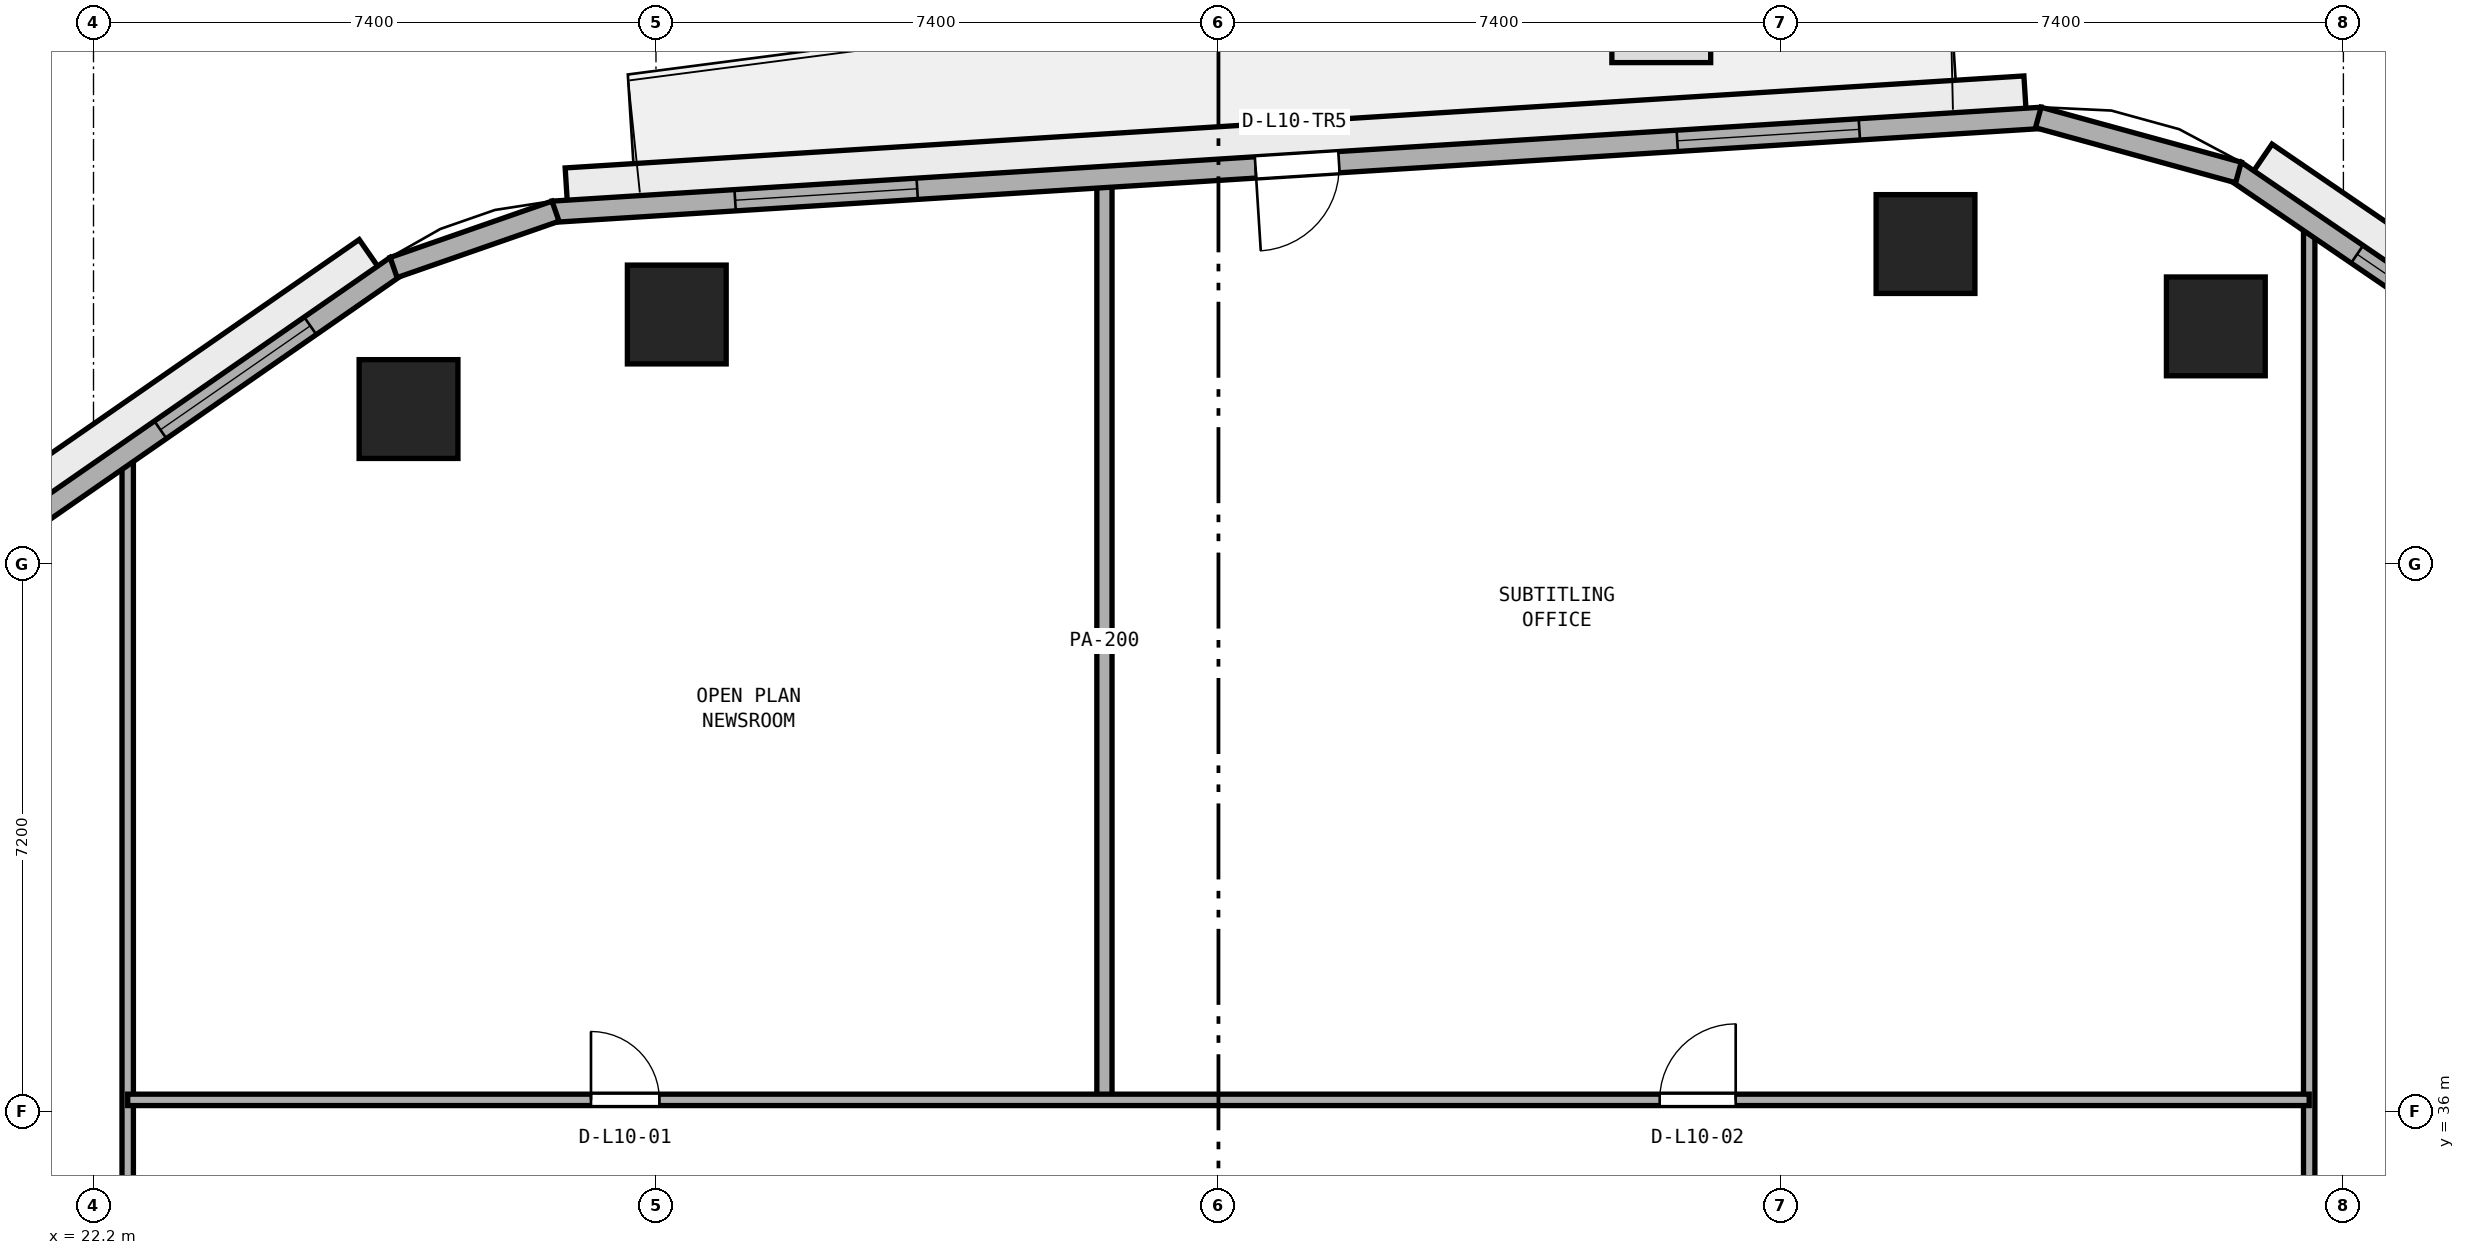
"""IFC4 building model, lengths in metres.
Left out: names, types, materials, properties, quantities, classifications, styles, units other than length and angle.
Written with IfcOpenShell. Run it as: python <this file> out.ifc"""

import sys

from ifc_helpers import new_model, si_unit, direction, frame, frame_2d, origin, origin_2d, place, context, subcontext, project, spatial, rectangle, extrude, element, fill, save


model = new_model("IFC4")
c1 = context("Model", 3, precision=1e-05, world=origin(), true_north=direction((0.0, 1.0)))
c2 = subcontext(c1, "Body", "Model", "MODEL_VIEW")
j1 = project(units=[si_unit("LENGTHUNIT", "METRE"), si_unit("PLANEANGLEUNIT", "RADIAN")], contexts=[c1])
p1 = place(None, origin())
s1 = spatial("IfcSite", under=j1, at=p1, CompositionType="ELEMENT")
p2 = place(p1, origin())
s2 = spatial("IfcBuilding", under=s1, at=p2, CompositionType="ELEMENT")
p3 = place(p2, frame((0.0, 0.0, 44.0)))
s3 = spatial("IfcBuildingStorey", under=s2, at=p3, CompositionType="ELEMENT", Elevation=44.0)
for number, where, z_axis, x_axis in (
    (1, (50.122, 46.326, 0.0), (0.0, 0.0, 1.0), (1.0, 0.0, 0.0)),
    (2, (46.302, 47.409, 0.0), (0.0, 0.0, 1.0), (1.0, 0.0, 0.0)),
    (3, (29.874, 46.482, 0.0), (0.0, 0.0, 1.0), (1.0, 0.0, 0.0)),
    (4, (26.344, 45.238, 0.0), (0.0, 0.0, 1.0), (1.0, 0.0, 0.0)),
):
    element("IfcColumn", number, at=place(p3, frame(where, z_axis=z_axis, x_axis=x_axis)), inside=s3, PredefinedType="COLUMN", context=c2, shape_type="SweptSolid", body=[
        extrude(rectangle(XDim=1.3, YDim=1.3, at=origin_2d()), origin(), (0.0, 0.0, 1.0), 3.8),
    ])
p4 = place(p3, frame((51.35, 2.843, 0.0), z_axis=(0.0, 0.0, 1.0), x_axis=(0.0, 1.0, 0.0)))
e5 = element("IfcWall", 5, at=p4, inside=s3, PredefinedType="PARTITIONING", context=c2, shape_type="SweptSolid", body=[
    extrude(rectangle(XDim=44.892, YDim=0.15, at=frame_2d((22.446, 0.0))), origin(), (0.0, 0.0, 1.0), 3.525),
])
p5 = place(p4, frame((21.907, 0.0, 0.0)))
e6 = element("IfcOpeningElement", 6, at=p5, cuts=e5, PredefinedType="OPENING", context=c2, shape_type="SweptSolid", body=[
    extrude(rectangle(XDim=0.9, YDim=2.1, at=frame_2d((0.45, 1.05))), frame((0.0, 0.085, 0.0), z_axis=(0.0, -1.0, 0.0), x_axis=(1.0, 0.0, 0.0)), (0.0, 0.0, 1.0), 0.17),
])
p6 = place(p3, frame((35.5, 36.15, 0.0), z_axis=(0.0, 0.0, 1.0), x_axis=(0.0, 1.0, 0.0)))
e7 = element("IfcWall", 7, at=p6, inside=s3, PredefinedType="PARTITIONING", context=c2, shape_type="SweptSolid", body=[
    extrude(rectangle(XDim=12.077, YDim=0.2, at=frame_2d((6.039, 0.0))), origin(), (0.0, 0.0, 1.0), 3.525),
])
p7 = place(p3, frame((22.65, 5.476, 0.0), z_axis=(0.0, 0.0, 1.0), x_axis=(0.0, 1.0, 0.0)))
e8 = element("IfcWall", 8, at=p7, inside=s3, PredefinedType="PARTITIONING", context=c2, shape_type="SweptSolid", body=[
    extrude(rectangle(XDim=39.221, YDim=0.15, at=frame_2d((19.61, 0.0))), origin(), (0.0, 0.0, 1.0), 3.525),
])
p8 = place(p7, frame((11.199, 0.0, 0.0)))
e9 = element("IfcOpeningElement", 9, at=p8, cuts=e8, PredefinedType="OPENING", context=c2, shape_type="SweptSolid", body=[
    extrude(rectangle(XDim=0.9, YDim=2.1, at=frame_2d((0.45, 1.05))), frame((0.0, 0.085, 0.0), z_axis=(0.0, -1.0, 0.0), x_axis=(1.0, 0.0, 0.0)), (0.0, 0.0, 1.0), 0.17),
])
p9 = place(p7, frame((17.824, 0.0, 0.0)))
e10 = element("IfcOpeningElement", 10, at=p9, cuts=e8, PredefinedType="OPENING", context=c2, shape_type="SweptSolid", body=[
    extrude(rectangle(XDim=0.9, YDim=2.1, at=frame_2d((0.45, 1.05))), frame((0.0, 0.085, 0.0), z_axis=(0.0, -1.0, 0.0), x_axis=(1.0, 0.0, 0.0)), (0.0, 0.0, 1.0), 0.17),
])
p10 = place(p7, frame((25.899, 0.0, 0.0)))
e11 = element("IfcOpeningElement", 11, at=p10, cuts=e8, PredefinedType="OPENING", context=c2, shape_type="SweptSolid", body=[
    extrude(rectangle(XDim=0.9, YDim=2.1, at=frame_2d((0.45, 1.05))), frame((0.0, 0.085, 0.0), z_axis=(0.0, -1.0, 0.0), x_axis=(1.0, 0.0, 0.0)), (0.0, 0.0, 1.0), 0.17),
])
p11 = place(p3, frame((22.65, 36.15, 0.0), z_axis=(0.0, 0.0, 1.0), x_axis=(1.0, 0.0, 0.0)))
e12 = element("IfcWall", 12, at=p11, inside=s3, PredefinedType="PARTITIONING", context=c2, shape_type="SweptSolid", body=[
    extrude(rectangle(XDim=28.7, YDim=0.15, at=frame_2d((14.35, 0.0))), origin(), (0.0, 0.0, 1.0), 3.525),
])
p12 = place(p11, frame((6.095, 0.0, 0.0)))
e13 = element("IfcOpeningElement", 13, at=p12, cuts=e12, PredefinedType="OPENING", context=c2, shape_type="SweptSolid", body=[
    extrude(rectangle(XDim=0.9, YDim=2.1, at=frame_2d((0.45, 1.05))), frame((0.0, 0.085, 0.0), z_axis=(0.0, -1.0, 0.0), x_axis=(1.0, 0.0, 0.0)), (0.0, 0.0, 1.0), 0.17),
])
p13 = place(p11, frame((20.155, 0.0, 0.0)))
e14 = element("IfcOpeningElement", 14, at=p13, cuts=e12, PredefinedType="OPENING", context=c2, shape_type="SweptSolid", body=[
    extrude(rectangle(XDim=1.0, YDim=2.12, at=frame_2d((0.5, 1.06))), frame((0.0, 0.085, 0.0), z_axis=(0.0, -1.0, 0.0), x_axis=(1.0, 0.0, 0.0)), (0.0, 0.0, 1.0), 0.17),
])
p14 = place(p3, frame((64.29, 38.867, 0.0), z_axis=(0.0, 0.0, 1.0), x_axis=(-0.825755550159, 0.564028165416, 0.0)))
e15 = element("IfcWall", 15, at=p14, inside=s3, PredefinedType="STANDARD", context=c2, shape_type="SweptSolid", body=[
    extrude(rectangle(XDim=16.848, YDim=0.28, at=frame_2d((8.424, 0.0))), origin(), (0.0, 0.0, 1.0), 3.525),
])
p15 = place(p14, frame((1.941, 0.0, 0.9)))
e16 = element("IfcOpeningElement", 16, at=p15, cuts=e15, PredefinedType="OPENING", context=c2, shape_type="SweptSolid", body=[
    extrude(rectangle(XDim=2.4, YDim=1.75, at=frame_2d((1.2, 0.875))), frame((0.0, 0.15, 0.0), z_axis=(0.0, -1.0, 0.0), x_axis=(1.0, 0.0, 0.0)), (0.0, 0.0, 1.0), 0.3),
])
p16 = place(p14, frame((7.224, 0.0, 0.9)))
e17 = element("IfcOpeningElement", 17, at=p16, cuts=e15, PredefinedType="OPENING", context=c2, shape_type="SweptSolid", body=[
    extrude(rectangle(XDim=2.4, YDim=1.75, at=frame_2d((1.2, 0.875))), frame((0.0, 0.15, 0.0), z_axis=(0.0, -1.0, 0.0), x_axis=(1.0, 0.0, 0.0)), (0.0, 0.0, 1.0), 0.3),
])
p17 = place(p14, frame((12.507, 0.0, 0.9)))
e18 = element("IfcOpeningElement", 18, at=p17, cuts=e15, PredefinedType="OPENING", context=c2, shape_type="SweptSolid", body=[
    extrude(rectangle(XDim=2.4, YDim=1.75, at=frame_2d((1.2, 0.875))), frame((0.0, 0.15, 0.0), z_axis=(0.0, -1.0, 0.0), x_axis=(1.0, 0.0, 0.0)), (0.0, 0.0, 1.0), 0.3),
])
p18 = place(p3, frame((47.832, 49.069, 0.0), z_axis=(0.0, 0.0, 1.0), x_axis=(-0.998017725054, -0.062933460723, 0.0)))
e19 = element("IfcWall", 19, at=p18, inside=s3, PredefinedType="STANDARD", context=c2, shape_type="SweptSolid", body=[
    extrude(rectangle(XDim=19.629, YDim=0.28, at=frame_2d((9.815, 0.0))), origin(), (0.0, 0.0, 1.0), 3.525),
])
p19 = place(p18, frame((9.265, 0.0, 0.0)))
e20 = element("IfcOpeningElement", 20, at=p19, cuts=e19, PredefinedType="OPENING", context=c2, shape_type="SweptSolid", body=[
    extrude(rectangle(XDim=1.1, YDim=2.2, at=frame_2d((0.55, 1.1))), frame((0.0, 0.15, 0.0), z_axis=(0.0, -1.0, 0.0), x_axis=(1.0, 0.0, 0.0)), (0.0, 0.0, 1.0), 0.3),
])
p20 = place(p18, frame((2.405, 0.0, 0.9)))
e21 = element("IfcOpeningElement", 21, at=p20, cuts=e19, PredefinedType="OPENING", context=c2, shape_type="SweptSolid", body=[
    extrude(rectangle(XDim=2.4, YDim=1.75, at=frame_2d((1.2, 0.875))), frame((0.0, 0.15, 0.0), z_axis=(0.0, -1.0, 0.0), x_axis=(1.0, 0.0, 0.0)), (0.0, 0.0, 1.0), 0.3),
])
p21 = place(p18, frame((14.825, 0.0, 0.9)))
e22 = element("IfcOpeningElement", 22, at=p21, cuts=e19, PredefinedType="OPENING", context=c2, shape_type="SweptSolid", body=[
    extrude(rectangle(XDim=2.4, YDim=1.75, at=frame_2d((1.2, 0.875))), frame((0.0, 0.15, 0.0), z_axis=(0.0, -1.0, 0.0), x_axis=(1.0, 0.0, 0.0)), (0.0, 0.0, 1.0), 0.3),
])
p22 = place(p3, frame((26.182, 47.118, 0.0), z_axis=(0.0, 0.0, 1.0), x_axis=(-0.821547956627, -0.570139417127, 0.0)))
e23 = element("IfcWall", 23, at=p22, inside=s3, PredefinedType="STANDARD", context=c2, shape_type="SweptSolid", body=[
    extrude(rectangle(XDim=18.132, YDim=0.28, at=frame_2d((9.066, 0.0))), origin(), (0.0, 0.0, 1.0), 3.525),
])
p23 = place(p22, frame((1.375, 0.0, 0.9)))
e24 = element("IfcOpeningElement", 24, at=p23, cuts=e23, PredefinedType="OPENING", context=c2, shape_type="SweptSolid", body=[
    extrude(rectangle(XDim=2.4, YDim=1.75, at=frame_2d((1.2, 0.875))), frame((0.0, 0.15, 0.0), z_axis=(0.0, -1.0, 0.0), x_axis=(1.0, 0.0, 0.0)), (0.0, 0.0, 1.0), 0.3),
])
p24 = place(p22, frame((7.866, 0.0, 0.9)))
e25 = element("IfcOpeningElement", 25, at=p24, cuts=e23, PredefinedType="OPENING", context=c2, shape_type="SweptSolid", body=[
    extrude(rectangle(XDim=2.4, YDim=1.75, at=frame_2d((1.2, 0.875))), frame((0.0, 0.15, 0.0), z_axis=(0.0, -1.0, 0.0), x_axis=(1.0, 0.0, 0.0)), (0.0, 0.0, 1.0), 0.3),
])
p25 = place(p22, frame((13.577, 0.0, 0.9)))
e26 = element("IfcOpeningElement", 26, at=p25, cuts=e23, PredefinedType="OPENING", context=c2, shape_type="SweptSolid", body=[
    extrude(rectangle(XDim=2.4, YDim=1.75, at=frame_2d((1.2, 0.875))), frame((0.0, 0.15, 0.0), z_axis=(0.0, -1.0, 0.0), x_axis=(1.0, 0.0, 0.0)), (0.0, 0.0, 1.0), 0.3),
])
p26 = place(p3, frame((50.419, 48.351, 0.0), z_axis=(0.0, 0.0, 1.0), x_axis=(-0.964254516967, 0.264977784933, 0.0)))
e27 = element("IfcWall", 27, at=p26, inside=s3, PredefinedType="STANDARD", context=c2, shape_type="SweptSolid", body=[
    extrude(rectangle(XDim=2.731, YDim=0.28, at=frame_2d((1.365, 0.0))), origin(), (0.0, 0.0, 1.0), 3.525),
])
p27 = place(p3, frame((28.278, 47.842, 0.0), z_axis=(0.0, 0.0, 1.0), x_axis=(-0.9444559001, -0.328638179106, 0.0)))
e28 = element("IfcWall", 28, at=p27, inside=s3, PredefinedType="STANDARD", context=c2, shape_type="SweptSolid", body=[
    extrude(rectangle(XDim=2.255, YDim=0.28, at=frame_2d((1.128, 0.0))), origin(), (0.0, 0.0, 1.0), 3.525),
])
p28 = place(p12, origin())
e29 = element("IfcDoor", 29, at=p28, inside=s3, OperationType="SINGLE_SWING_LEFT", PredefinedType="DOOR", context=c2, shape_type="SweptSolid", body=[
    extrude(rectangle(XDim=0.9, YDim=2.1, at=frame_2d((0.45, 1.05))), frame((0.0, 0.025, 0.0), z_axis=(0.0, -1.0, 0.0), x_axis=(1.0, 0.0, 0.0)), (0.0, 0.0, 1.0), 0.05),
])
fill(e13, e29)
p29 = place(p13, origin())
e30 = element("IfcDoor", 30, at=p29, inside=s3, OperationType="SINGLE_SWING_RIGHT", PredefinedType="DOOR", context=c2, shape_type="SweptSolid", body=[
    extrude(rectangle(XDim=1.0, YDim=2.12, at=frame_2d((0.5, 1.06))), frame((0.0, 0.025, 0.0), z_axis=(0.0, -1.0, 0.0), x_axis=(1.0, 0.0, 0.0)), (0.0, 0.0, 1.0), 0.05),
])
fill(e14, e30)
p30 = place(p17, origin())
e31 = element("IfcWindow", 31, at=p30, inside=s3, PartitioningType="SINGLE_PANEL", PredefinedType="WINDOW", context=c2, shape_type="SweptSolid", body=[
    extrude(rectangle(XDim=2.4, YDim=1.75, at=frame_2d((1.2, 0.875))), frame((0.0, 0.03, 0.0), z_axis=(0.0, -1.0, 0.0), x_axis=(1.0, 0.0, 0.0)), (0.0, 0.0, 1.0), 0.06),
])
fill(e18, e31)
p31 = place(p19, origin())
e32 = element("IfcDoor", 32, at=p31, inside=s3, OperationType="SINGLE_SWING_RIGHT", PredefinedType="DOOR", context=c2, shape_type="SweptSolid", body=[
    extrude(rectangle(XDim=1.1, YDim=2.2, at=frame_2d((0.55, 1.1))), frame((0.0, 0.025, 0.0), z_axis=(0.0, -1.0, 0.0), x_axis=(1.0, 0.0, 0.0)), (0.0, 0.0, 1.0), 0.05),
])
fill(e20, e32)
p32 = place(p20, origin())
e33 = element("IfcWindow", 33, at=p32, inside=s3, PartitioningType="SINGLE_PANEL", PredefinedType="WINDOW", context=c2, shape_type="SweptSolid", body=[
    extrude(rectangle(XDim=2.4, YDim=1.75, at=frame_2d((1.2, 0.875))), frame((0.0, 0.03, 0.0), z_axis=(0.0, -1.0, 0.0), x_axis=(1.0, 0.0, 0.0)), (0.0, 0.0, 1.0), 0.06),
])
fill(e21, e33)
p33 = place(p21, origin())
e34 = element("IfcWindow", 34, at=p33, inside=s3, PartitioningType="SINGLE_PANEL", PredefinedType="WINDOW", context=c2, shape_type="SweptSolid", body=[
    extrude(rectangle(XDim=2.4, YDim=1.75, at=frame_2d((1.2, 0.875))), frame((0.0, 0.03, 0.0), z_axis=(0.0, -1.0, 0.0), x_axis=(1.0, 0.0, 0.0)), (0.0, 0.0, 1.0), 0.06),
])
fill(e22, e34)
p34 = place(p23, origin())
e35 = element("IfcWindow", 35, at=p34, inside=s3, PartitioningType="SINGLE_PANEL", PredefinedType="WINDOW", context=c2, shape_type="SweptSolid", body=[
    extrude(rectangle(XDim=2.4, YDim=1.75, at=frame_2d((1.2, 0.875))), frame((0.0, 0.03, 0.0), z_axis=(0.0, -1.0, 0.0), x_axis=(1.0, 0.0, 0.0)), (0.0, 0.0, 1.0), 0.06),
])
fill(e24, e35)
save(model, sys.argv[1])
